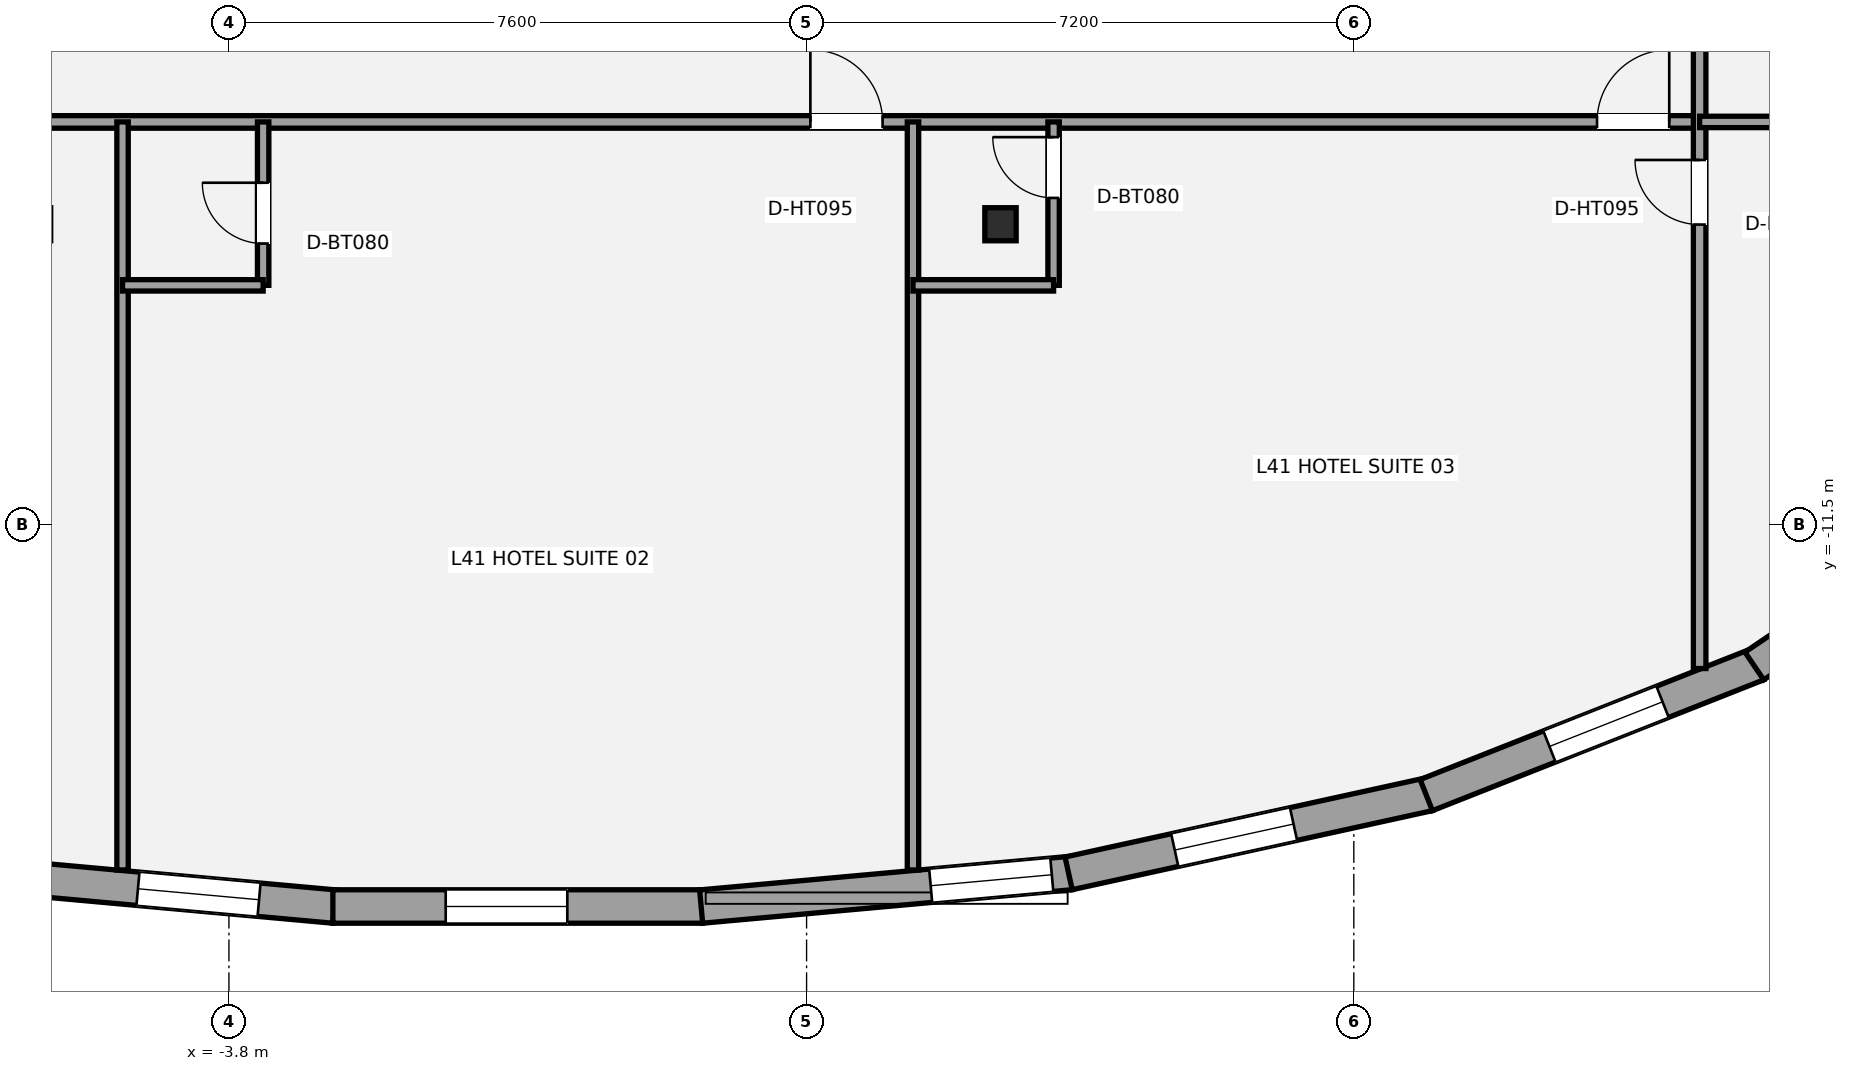
"""IFC4 building model, lengths in metres.
Left out: names, types, materials, properties, quantities, classifications, styles, units other than length and angle.
Written with IfcOpenShell. Run it as: python <this file> out.ifc"""

import sys

from ifc_helpers import new_model, si_unit, direction, frame, frame_2d, origin, origin_2d, place, context, subcontext, project, spatial, rectangle, i_section, extrude, element, fill, save


model = new_model("IFC4")
c1 = context("Model", 3, precision=1e-05, world=origin(), true_north=direction((0.0, 1.0)))
c2 = subcontext(c1, "Body", "Model", "MODEL_VIEW")
j1 = project(units=[si_unit("LENGTHUNIT", "METRE"), si_unit("PLANEANGLEUNIT", "RADIAN")], contexts=[c1])
p1 = place(None, origin())
s1 = spatial("IfcSite", under=j1, at=p1, CompositionType="ELEMENT")
p2 = place(p1, origin())
s2 = spatial("IfcBuilding", under=s1, at=p2, CompositionType="ELEMENT")
p3 = place(p2, frame((0.0, 0.0, 153.4)))
s3 = spatial("IfcBuildingStorey", under=s2, at=p3, CompositionType="ELEMENT", Elevation=153.4)
p4 = place(p3, frame((6.351, -7.546, 0.0), z_axis=(0.0, 0.0, 1.0), x_axis=(1.0, 0.0, 0.0)))
e1 = element("IfcColumn", 1, at=p4, inside=s3, PredefinedType="COLUMN", context=c2, shape_type="SweptSolid", body=[
    extrude(i_section(OverallWidth=0.412, OverallDepth=0.435, WebThickness=0.036, FlangeThickness=0.057, at=origin_2d()), origin(), (0.0, 0.0, 1.0), 3.2),
])
p5 = place(p3, frame((-2.413, -16.523, 0.0), z_axis=(0.0, 0.0, 1.0), x_axis=(-0.995913675095, 0.090310308155, 0.0)))
e2 = element("IfcWall", 2, at=p5, inside=s3, PredefinedType="STANDARD", context=c2, shape_type="SweptSolid", body=[
    extrude(rectangle(XDim=4.882, YDim=0.44, at=frame_2d((2.441, 0.0))), origin(), (0.0, 0.0, 1.0), 2.315),
])
p6 = place(p5, frame((0.995, 0.0, 0.58)))
e3 = element("IfcOpeningElement", 3, at=p6, cuts=e2, PredefinedType="OPENING", context=c2, shape_type="SweptSolid", body=[
    extrude(rectangle(XDim=1.6, YDim=1.55, at=frame_2d((0.8, 0.775))), frame((0.0, 0.23, 0.0), z_axis=(0.0, -1.0, 0.0), x_axis=(1.0, 0.0, 0.0)), (0.0, 0.0, 1.0), 0.46),
])
p7 = place(p3, frame((2.433, -16.522, 0.0), z_axis=(0.0, 0.0, 1.0), x_axis=(-1.0, 0.0, 0.0)))
e4 = element("IfcWall", 4, at=p7, inside=s3, PredefinedType="STANDARD", context=c2, shape_type="SweptSolid", body=[
    extrude(rectangle(XDim=4.865, YDim=0.44, at=frame_2d((2.433, 0.0))), origin(), (0.0, 0.0, 1.0), 2.315),
])
p8 = place(p7, frame((1.781, 0.0, 0.58)))
e5 = element("IfcOpeningElement", 5, at=p8, cuts=e4, PredefinedType="OPENING", context=c2, shape_type="SweptSolid", body=[
    extrude(rectangle(XDim=1.6, YDim=1.55, at=frame_2d((0.8, 0.775))), frame((0.0, 0.23, 0.0), z_axis=(0.0, -1.0, 0.0), x_axis=(1.0, 0.0, 0.0)), (0.0, 0.0, 1.0), 0.46),
])
p9 = place(p3, frame((7.275, -16.082, 0.0), z_axis=(0.0, 0.0, 1.0), x_axis=(-0.995913675095, -0.090310308155, 0.0)))
e6 = element("IfcWall", 6, at=p9, inside=s3, PredefinedType="STANDARD", context=c2, shape_type="SweptSolid", body=[
    extrude(rectangle(XDim=4.882, YDim=0.44, at=frame_2d((2.441, 0.0))), origin(), (0.0, 0.0, 1.0), 2.315),
])
p10 = place(p9, frame((0.25, 0.0, 0.58)))
e7 = element("IfcOpeningElement", 7, at=p10, cuts=e6, PredefinedType="OPENING", context=c2, shape_type="SweptSolid", body=[
    extrude(rectangle(XDim=1.6, YDim=1.55, at=frame_2d((0.8, 0.775))), frame((0.0, 0.23, 0.0), z_axis=(0.0, -1.0, 0.0), x_axis=(1.0, 0.0, 0.0)), (0.0, 0.0, 1.0), 0.46),
])
p11 = place(p3, frame((11.987, -15.046, 0.0), z_axis=(0.0, 0.0, 1.0), x_axis=(-0.976767211892, -0.214303088576, 0.0)))
e8 = element("IfcWall", 8, at=p11, inside=s3, PredefinedType="STANDARD", context=c2, shape_type="SweptSolid", body=[
    extrude(rectangle(XDim=4.852, YDim=0.44, at=frame_2d((2.426, 0.0))), origin(), (0.0, 0.0, 1.0), 2.315),
])
p12 = place(p11, frame((1.823, 0.0, 0.58)))
e9 = element("IfcOpeningElement", 9, at=p12, cuts=e8, PredefinedType="OPENING", context=c2, shape_type="SweptSolid", body=[
    extrude(rectangle(XDim=1.6, YDim=1.55, at=frame_2d((0.8, 0.775))), frame((0.0, 0.23, 0.0), z_axis=(0.0, -1.0, 0.0), x_axis=(1.0, 0.0, 0.0)), (0.0, 0.0, 1.0), 0.46),
])
p13 = place(p3, frame((16.312, -13.335, 0.0), z_axis=(0.0, 0.0, 1.0), x_axis=(-0.930130872211, -0.367228213186, 0.0)))
e10 = element("IfcWall", 10, at=p13, inside=s3, PredefinedType="STANDARD", context=c2, shape_type="SweptSolid", body=[
    extrude(rectangle(XDim=4.686, YDim=0.44, at=frame_2d((2.343, 0.0))), origin(), (0.0, 0.0, 1.0), 2.315),
])
p14 = place(p13, frame((1.344, 0.0, 0.58)))
e11 = element("IfcOpeningElement", 11, at=p14, cuts=e10, PredefinedType="OPENING", context=c2, shape_type="SweptSolid", body=[
    extrude(rectangle(XDim=1.6, YDim=1.55, at=frame_2d((0.8, 0.775))), frame((0.0, 0.23, 0.0), z_axis=(0.0, -1.0, 0.0), x_axis=(1.0, 0.0, 0.0)), (0.0, 0.0, 1.0), 0.46),
])
p15 = place(p3, frame((19.852, -10.93, 0.0), z_axis=(0.0, 0.0, 1.0), x_axis=(-0.827746250701, -0.561102614902, 0.0)))
e12 = element("IfcWall", 12, at=p15, inside=s3, PredefinedType="STANDARD", context=c2, shape_type="SweptSolid", body=[
    extrude(rectangle(XDim=4.327, YDim=0.44, at=frame_2d((2.164, 0.0))), origin(), (0.0, 0.0, 1.0), 2.315),
])
p16 = place(p15, frame((1.686, 0.0, 0.58)))
e13 = element("IfcOpeningElement", 13, at=p16, cuts=e12, PredefinedType="OPENING", context=c2, shape_type="SweptSolid", body=[
    extrude(rectangle(XDim=1.6, YDim=1.55, at=frame_2d((0.8, 0.775))), frame((0.0, 0.23, 0.0), z_axis=(0.0, -1.0, 0.0), x_axis=(1.0, 0.0, 0.0)), (0.0, 0.0, 1.0), 0.46),
])
p17 = place(p3, frame((-15.75, -6.2, 0.0), z_axis=(0.0, 0.0, 1.0), x_axis=(1.0, 0.0, 0.0)))
e14 = element("IfcWall", 14, at=p17, inside=s3, PredefinedType="PARTITIONING", context=c2, shape_type="SweptSolid", body=[
    extrude(rectangle(XDim=31.3, YDim=0.165, at=frame_2d((15.65, 0.0))), origin(), (0.0, 0.0, 1.0), 2.398),
])
p18 = place(p17, frame((8.12, 0.0, 0.0)))
e15 = element("IfcOpeningElement", 15, at=p18, cuts=e14, PredefinedType="OPENING", context=c2, shape_type="SweptSolid", body=[
    extrude(rectangle(XDim=0.95, YDim=2.15, at=frame_2d((0.475, 1.075))), frame((0.0, 0.093, 0.0), z_axis=(0.0, -1.0, 0.0), x_axis=(1.0, 0.0, 0.0)), (0.0, 0.0, 1.0), 0.185),
])
p19 = place(p17, frame((19.6, 0.0, 0.0)))
e16 = element("IfcOpeningElement", 16, at=p19, cuts=e14, PredefinedType="OPENING", context=c2, shape_type="SweptSolid", body=[
    extrude(rectangle(XDim=0.95, YDim=2.15, at=frame_2d((0.475, 1.075))), frame((0.0, 0.093, 0.0), z_axis=(0.0, -1.0, 0.0), x_axis=(1.0, 0.0, 0.0)), (0.0, 0.0, 1.0), 0.185),
])
p20 = place(p17, frame((29.95, 0.0, 0.0)))
e17 = element("IfcOpeningElement", 17, at=p20, cuts=e14, PredefinedType="OPENING", context=c2, shape_type="SweptSolid", body=[
    extrude(rectangle(XDim=0.95, YDim=2.15, at=frame_2d((0.475, 1.075))), frame((0.0, 0.093, 0.0), z_axis=(0.0, -1.0, 0.0), x_axis=(1.0, 0.0, 0.0)), (0.0, 0.0, 1.0), 0.185),
])
p21 = place(p3, frame((15.55, -13.391, 0.0), z_axis=(0.0, 0.0, 1.0), x_axis=(0.0, 1.0, 0.0)))
e18 = element("IfcWall", 18, at=p21, inside=s3, PredefinedType="PARTITIONING", context=c2, shape_type="SweptSolid", body=[
    extrude(rectangle(XDim=20.941, YDim=0.165, at=frame_2d((10.471, 0.0))), origin(), (0.0, 0.0, 1.0), 2.473),
])
p22 = place(p21, frame((5.841, 0.0, 0.0)))
e19 = element("IfcOpeningElement", 19, at=p22, cuts=e18, PredefinedType="OPENING", context=c2, shape_type="SweptSolid", body=[
    extrude(rectangle(XDim=0.85, YDim=2.1, at=frame_2d((0.425, 1.05))), frame((0.0, 0.093, 0.0), z_axis=(0.0, -1.0, 0.0), x_axis=(1.0, 0.0, 0.0)), (0.0, 0.0, 1.0), 0.185),
])
p23 = place(p21, frame((13.841, 0.0, 0.0)))
e20 = element("IfcOpeningElement", 20, at=p23, cuts=e18, PredefinedType="OPENING", context=c2, shape_type="SweptSolid", body=[
    extrude(rectangle(XDim=0.95, YDim=2.15, at=frame_2d((0.475, 1.075))), frame((0.0, 0.093, 0.0), z_axis=(0.0, -1.0, 0.0), x_axis=(1.0, 0.0, 0.0)), (0.0, 0.0, 1.0), 0.185),
])
p24 = place(p21, frame((19.591, 0.0, 0.0)))
e21 = element("IfcOpeningElement", 21, at=p24, cuts=e18, PredefinedType="OPENING", context=c2, shape_type="SweptSolid", body=[
    extrude(rectangle(XDim=0.95, YDim=2.15, at=frame_2d((0.475, 1.075))), frame((0.0, 0.093, 0.0), z_axis=(0.0, -1.0, 0.0), x_axis=(1.0, 0.0, 0.0)), (0.0, 0.0, 1.0), 0.185),
])
p25 = place(p3, frame((15.55, -6.2, 0.0), z_axis=(0.0, 0.0, 1.0), x_axis=(1.0, 0.0, 0.0)))
e22 = element("IfcWall", 22, at=p25, inside=s3, PredefinedType="PLUMBINGWALL", context=c2, shape_type="SweptSolid", body=[
    extrude(rectangle(XDim=7.402, YDim=0.15, at=frame_2d((3.701, 0.0))), origin(), (0.0, 0.0, 1.0), 2.473),
])
for number, where, z_axis, x_axis in (
    (23, (-5.2, -16.041, 0.0), (0.0, 0.0, 1.0), (0.0, 1.0, 0.0)),
    (24, (5.2, -16.041, 0.0), (0.0, 0.0, 1.0), (0.0, 1.0, 0.0)),
):
    element("IfcWall", number, at=place(p3, frame(where, z_axis=z_axis, x_axis=x_axis)), inside=s3, PredefinedType="PLUMBINGWALL", context=c2, shape_type="SweptSolid", body=[
        extrude(rectangle(XDim=9.841, YDim=0.15, at=frame_2d((4.92, 0.0))), origin(), (0.0, 0.0, 1.0), 2.473),
    ])
p26 = place(p3, frame((-3.35, -8.35, 0.0), z_axis=(0.0, 0.0, 1.0), x_axis=(0.0, 1.0, 0.0)))
e25 = element("IfcWall", 25, at=p26, inside=s3, PredefinedType="PLUMBINGWALL", context=c2, shape_type="SweptSolid", body=[
    extrude(rectangle(XDim=2.15, YDim=0.15, at=frame_2d((1.075, 0.0))), origin(), (0.0, 0.0, 1.0), 2.473),
])
p27 = place(p26, frame((0.55, 0.0, 0.0)))
e26 = element("IfcOpeningElement", 26, at=p27, cuts=e25, PredefinedType="OPENING", context=c2, shape_type="SweptSolid", body=[
    extrude(rectangle(XDim=0.8, YDim=2.1, at=frame_2d((0.4, 1.05))), frame((0.0, 0.085, 0.0), z_axis=(0.0, -1.0, 0.0), x_axis=(1.0, 0.0, 0.0)), (0.0, 0.0, 1.0), 0.17),
])
p28 = place(p3, frame((-5.2, -8.35, 0.0), z_axis=(0.0, 0.0, 1.0), x_axis=(1.0, 0.0, 0.0)))
e27 = element("IfcWall", 27, at=p28, inside=s3, PredefinedType="PLUMBINGWALL", context=c2, shape_type="SweptSolid", body=[
    extrude(rectangle(XDim=1.85, YDim=0.15, at=frame_2d((0.925, 0.0))), origin(), (0.0, 0.0, 1.0), 2.473),
])
p29 = place(p3, frame((7.05, -8.35, 0.0), z_axis=(0.0, 0.0, 1.0), x_axis=(0.0, 1.0, 0.0)))
e28 = element("IfcWall", 28, at=p29, inside=s3, PredefinedType="PLUMBINGWALL", context=c2, shape_type="SweptSolid", body=[
    extrude(rectangle(XDim=2.15, YDim=0.15, at=frame_2d((1.075, 0.0))), origin(), (0.0, 0.0, 1.0), 2.473),
])
p30 = place(p29, frame((1.15, 0.0, 0.0)))
e29 = element("IfcOpeningElement", 29, at=p30, cuts=e28, PredefinedType="OPENING", context=c2, shape_type="SweptSolid", body=[
    extrude(rectangle(XDim=0.8, YDim=2.1, at=frame_2d((0.4, 1.05))), frame((0.0, 0.085, 0.0), z_axis=(0.0, -1.0, 0.0), x_axis=(1.0, 0.0, 0.0)), (0.0, 0.0, 1.0), 0.17),
])
p31 = place(p3, frame((5.2, -8.35, 0.0), z_axis=(0.0, 0.0, 1.0), x_axis=(1.0, 0.0, 0.0)))
e30 = element("IfcWall", 30, at=p31, inside=s3, PredefinedType="PLUMBINGWALL", context=c2, shape_type="SweptSolid", body=[
    extrude(rectangle(XDim=1.85, YDim=0.15, at=frame_2d((0.925, 0.0))), origin(), (0.0, 0.0, 1.0), 2.473),
])
p32 = place(p6, origin())
e31 = element("IfcWindow", 31, at=p32, inside=s3, PartitioningType="SINGLE_PANEL", PredefinedType="WINDOW", context=c2, shape_type="SweptSolid", body=[
    extrude(rectangle(XDim=1.6, YDim=1.55, at=frame_2d((0.8, 0.775))), frame((0.0, -0.01, 0.0), z_axis=(0.0, -1.0, 0.0), x_axis=(1.0, 0.0, 0.0)), (0.0, 0.0, 1.0), 0.06),
])
fill(e3, e31)
p33 = place(p8, origin())
e32 = element("IfcWindow", 32, at=p33, inside=s3, PartitioningType="SINGLE_PANEL", PredefinedType="WINDOW", context=c2, shape_type="SweptSolid", body=[
    extrude(rectangle(XDim=1.6, YDim=1.55, at=frame_2d((0.8, 0.775))), frame((0.0, -0.01, 0.0), z_axis=(0.0, -1.0, 0.0), x_axis=(1.0, 0.0, 0.0)), (0.0, 0.0, 1.0), 0.06),
])
fill(e5, e32)
p34 = place(p10, origin())
e33 = element("IfcWindow", 33, at=p34, inside=s3, PartitioningType="SINGLE_PANEL", PredefinedType="WINDOW", context=c2, shape_type="SweptSolid", body=[
    extrude(rectangle(XDim=1.6, YDim=1.55, at=frame_2d((0.8, 0.775))), frame((0.0, -0.01, 0.0), z_axis=(0.0, -1.0, 0.0), x_axis=(1.0, 0.0, 0.0)), (0.0, 0.0, 1.0), 0.06),
])
fill(e7, e33)
p35 = place(p12, origin())
e34 = element("IfcWindow", 34, at=p35, inside=s3, PartitioningType="SINGLE_PANEL", PredefinedType="WINDOW", context=c2, shape_type="SweptSolid", body=[
    extrude(rectangle(XDim=1.6, YDim=1.55, at=frame_2d((0.8, 0.775))), frame((0.0, -0.01, 0.0), z_axis=(0.0, -1.0, 0.0), x_axis=(1.0, 0.0, 0.0)), (0.0, 0.0, 1.0), 0.06),
])
fill(e9, e34)
p36 = place(p14, origin())
e35 = element("IfcWindow", 35, at=p36, inside=s3, PartitioningType="SINGLE_PANEL", PredefinedType="WINDOW", context=c2, shape_type="SweptSolid", body=[
    extrude(rectangle(XDim=1.6, YDim=1.55, at=frame_2d((0.8, 0.775))), frame((0.0, -0.01, 0.0), z_axis=(0.0, -1.0, 0.0), x_axis=(1.0, 0.0, 0.0)), (0.0, 0.0, 1.0), 0.06),
])
fill(e11, e35)
p37 = place(p22, origin())
e36 = element("IfcDoor", 36, at=p37, inside=s3, OperationType="SINGLE_SWING_RIGHT", PredefinedType="DOOR", context=c2, shape_type="SweptSolid", body=[
    extrude(rectangle(XDim=0.85, YDim=2.1, at=frame_2d((0.425, 1.05))), frame((0.0, 0.025, 0.0), z_axis=(0.0, -1.0, 0.0), x_axis=(1.0, 0.0, 0.0)), (0.0, 0.0, 1.0), 0.05),
])
fill(e19, e36)
p38 = place(p19, origin())
e37 = element("IfcDoor", 37, at=p38, inside=s3, OperationType="SINGLE_SWING_LEFT", PredefinedType="DOOR", context=c2, shape_type="SweptSolid", body=[
    extrude(rectangle(XDim=0.95, YDim=2.15, at=frame_2d((0.475, 1.075))), frame((0.0, 0.025, 0.0), z_axis=(0.0, -1.0, 0.0), x_axis=(1.0, 0.0, 0.0)), (0.0, 0.0, 1.0), 0.05),
])
fill(e16, e37)
p39 = place(p27, origin())
e38 = element("IfcDoor", 38, at=p39, inside=s3, OperationType="SINGLE_SWING_RIGHT", PredefinedType="DOOR", context=c2, shape_type="SweptSolid", body=[
    extrude(rectangle(XDim=0.8, YDim=2.1, at=frame_2d((0.4, 1.05))), frame((0.0, 0.025, 0.0), z_axis=(0.0, -1.0, 0.0), x_axis=(1.0, 0.0, 0.0)), (0.0, 0.0, 1.0), 0.05),
])
fill(e26, e38)
p40 = place(p20, origin())
e39 = element("IfcDoor", 39, at=p40, inside=s3, OperationType="SINGLE_SWING_RIGHT", PredefinedType="DOOR", context=c2, shape_type="SweptSolid", body=[
    extrude(rectangle(XDim=0.95, YDim=2.15, at=frame_2d((0.475, 1.075))), frame((0.0, 0.025, 0.0), z_axis=(0.0, -1.0, 0.0), x_axis=(1.0, 0.0, 0.0)), (0.0, 0.0, 1.0), 0.05),
])
fill(e17, e39)
p41 = place(p30, origin())
e40 = element("IfcDoor", 40, at=p41, inside=s3, OperationType="SINGLE_SWING_RIGHT", PredefinedType="DOOR", context=c2, shape_type="SweptSolid", body=[
    extrude(rectangle(XDim=0.8, YDim=2.1, at=frame_2d((0.4, 1.05))), frame((0.0, 0.025, 0.0), z_axis=(0.0, -1.0, 0.0), x_axis=(1.0, 0.0, 0.0)), (0.0, 0.0, 1.0), 0.05),
])
fill(e29, e40)
save(model, sys.argv[1])
